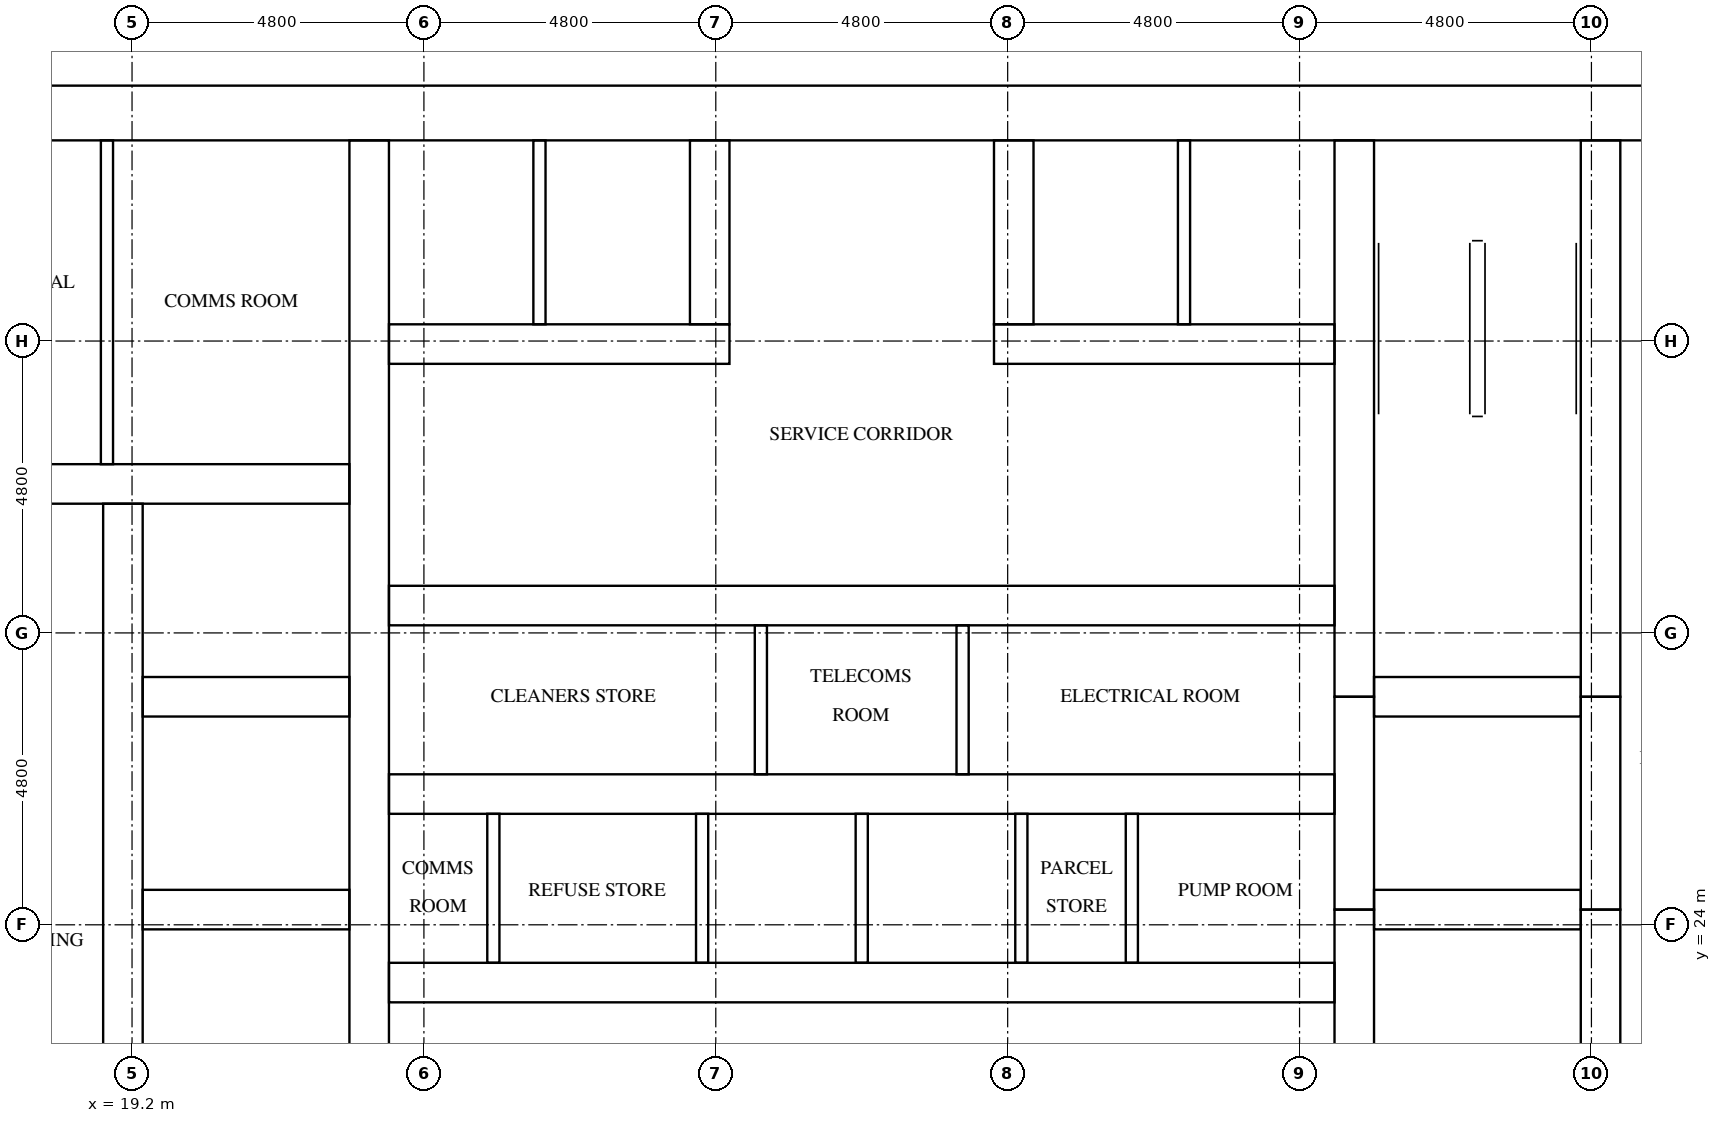
"""IFC4 building model, lengths in metres.
Left out: names, types, materials, properties, quantities, classifications, styles, units other than length and angle.
Written with IfcOpenShell. Run it as: python <this file> out.ifc"""

import sys

from ifc_helpers import new_model, si_unit, direction, frame, frame_2d, origin, place, context, subcontext, project, spatial, rectangle, extrude, element, fill, save


model = new_model("IFC4")
c1 = context("Model", 3, precision=1e-05, world=origin(), true_north=direction((0.0, 1.0)))
c2 = subcontext(c1, "Body", "Model", "MODEL_VIEW")
j1 = project(units=[si_unit("LENGTHUNIT", "METRE"), si_unit("PLANEANGLEUNIT", "RADIAN")], contexts=[c1])
p1 = place(None, origin())
s1 = spatial("IfcSite", under=j1, at=p1, CompositionType="ELEMENT")
p2 = place(p1, origin())
s2 = spatial("IfcBuilding", under=s1, at=p2, CompositionType="ELEMENT")
p3 = place(p2, frame((0.0, 0.0, 110.2)))
s3 = spatial("IfcBuildingStorey", under=s2, at=p3, CompositionType="ELEMENT", Elevation=110.2)
p4 = place(p3, frame((15.0, 37.35, 0.0), z_axis=(0.0, 0.0, 1.0), x_axis=(1.0, 0.0, 0.0)))
e1 = element("IfcWall", 1, at=p4, inside=s3, PredefinedType="SHEAR", context=c2, shape_type="SweptSolid", body=[
    extrude(rectangle(XDim=32.4, YDim=0.9, at=frame_2d((16.2, 0.0))), origin(), (0.0, 0.0, 1.0), 3.1),
])
p5 = place(p4, frame((15.3, 0.0, 0.0)))
e2 = element("IfcOpeningElement", 2, at=p5, cuts=e1, PredefinedType="OPENING", context=c2, shape_type="SweptSolid", body=[
    extrude(rectangle(XDim=1.8, YDim=2.1, at=frame_2d((0.9, 1.05))), frame((0.0, 0.46, 0.0), z_axis=(0.0, -1.0, 0.0), x_axis=(1.0, 0.0, 0.0)), (0.0, 0.0, 1.0), 0.92),
])
p6 = place(p4, frame((1.794, 0.0, 0.0)))
e3 = element("IfcOpeningElement", 3, at=p6, cuts=e1, PredefinedType="OPENING", context=c2, shape_type="SweptSolid", body=[
    extrude(rectangle(XDim=1.0, YDim=2.1, at=frame_2d((0.5, 1.05))), frame((0.0, 0.46, 0.0), z_axis=(0.0, -1.0, 0.0), x_axis=(1.0, 0.0, 0.0)), (0.0, 0.0, 1.0), 0.92),
])
p7 = place(p4, frame((5.331, 0.0, 0.0)))
e4 = element("IfcOpeningElement", 4, at=p7, cuts=e1, PredefinedType="OPENING", context=c2, shape_type="SweptSolid", body=[
    extrude(rectangle(XDim=1.0, YDim=2.1, at=frame_2d((0.5, 1.05))), frame((0.0, 0.46, 0.0), z_axis=(0.0, -1.0, 0.0), x_axis=(1.0, 0.0, 0.0)), (0.0, 0.0, 1.0), 0.92),
])
p8 = place(p3, frame((19.05, 15.9, 0.0), z_axis=(0.0, 0.0, 1.0), x_axis=(0.0, 1.0, 0.0)))
e5 = element("IfcWall", 5, at=p8, inside=s3, PredefinedType="SHEAR", context=c2, shape_type="SweptSolid", body=[
    extrude(rectangle(XDim=15.025, YDim=0.65, at=frame_2d((7.513, 0.0))), origin(), (0.0, 0.0, 1.0), 3.1),
])
p9 = place(p8, frame((9.55, 0.0, 0.0)))
e6 = element("IfcOpeningElement", 6, at=p9, cuts=e5, PredefinedType="OPENING", context=c2, shape_type="SweptSolid", body=[
    extrude(rectangle(XDim=1.1, YDim=2.1, at=frame_2d((0.55, 1.05))), frame((0.0, 0.335, 0.0), z_axis=(0.0, -1.0, 0.0), x_axis=(1.0, 0.0, 0.0)), (0.0, 0.0, 1.0), 0.67),
])
p10 = place(p8, frame((13.05, 0.0, 0.0)))
e7 = element("IfcOpeningElement", 7, at=p10, cuts=e5, PredefinedType="OPENING", context=c2, shape_type="SweptSolid", body=[
    extrude(rectangle(XDim=1.1, YDim=2.1, at=frame_2d((0.55, 1.05))), frame((0.0, 0.335, 0.0), z_axis=(0.0, -1.0, 0.0), x_axis=(1.0, 0.0, 0.0)), (0.0, 0.0, 1.0), 0.67),
])
p11 = place(p8, frame((0.3, 0.0, 0.0)))
e8 = element("IfcOpeningElement", 8, at=p11, cuts=e5, PredefinedType="OPENING", context=c2, shape_type="SweptSolid", body=[
    extrude(rectangle(XDim=1.2, YDim=2.1, at=frame_2d((0.6, 1.05))), frame((0.0, 0.335, 0.0), z_axis=(0.0, -1.0, 0.0), x_axis=(1.0, 0.0, 0.0)), (0.0, 0.0, 1.0), 0.67),
])
p12 = place(p3, frame((23.1, 15.9, 0.0), z_axis=(0.0, 0.0, 1.0), x_axis=(0.0, 1.0, 0.0)))
e9 = element("IfcWall", 9, at=p12, inside=s3, PredefinedType="SHEAR", context=c2, shape_type="SweptSolid", body=[
    extrude(rectangle(XDim=21.0, YDim=0.65, at=frame_2d((10.5, 0.0))), origin(), (0.0, 0.0, 1.0), 3.1),
])
p13 = place(p3, frame((39.3, 15.9, 0.0), z_axis=(0.0, 0.0, 1.0), x_axis=(0.0, 1.0, 0.0)))
e10 = element("IfcWall", 10, at=p13, inside=s3, PredefinedType="SHEAR", context=c2, shape_type="SweptSolid", body=[
    extrude(rectangle(XDim=8.35, YDim=0.65, at=frame_2d((4.175, 0.0))), origin(), (0.0, 0.0, 1.0), 3.1),
])
p14 = place(p3, frame((39.3, 24.25, 0.0), z_axis=(0.0, 0.0, 1.0), x_axis=(0.0, 1.0, 0.0)))
e11 = element("IfcWall", 11, at=p14, inside=s3, PredefinedType="SHEAR", context=c2, shape_type="SweptSolid", body=[
    extrude(rectangle(XDim=3.5, YDim=0.65, at=frame_2d((1.75, 0.0))), origin(), (0.0, 0.0, 1.0), 3.1),
])
p15 = place(p3, frame((39.3, 27.75, 0.0), z_axis=(0.0, 0.0, 1.0), x_axis=(0.0, 1.0, 0.0)))
e12 = element("IfcWall", 12, at=p15, inside=s3, PredefinedType="SHEAR", context=c2, shape_type="SweptSolid", body=[
    extrude(rectangle(XDim=9.15, YDim=0.65, at=frame_2d((4.575, 0.0))), origin(), (0.0, 0.0, 1.0), 3.1),
])
p16 = place(p3, frame((43.35, 15.9, 0.0), z_axis=(0.0, 0.0, 1.0), x_axis=(0.0, 1.0, 0.0)))
e13 = element("IfcWall", 13, at=p16, inside=s3, PredefinedType="SHEAR", context=c2, shape_type="SweptSolid", body=[
    extrude(rectangle(XDim=8.35, YDim=0.65, at=frame_2d((4.175, 0.0))), origin(), (0.0, 0.0, 1.0), 3.1),
])
p17 = place(p16, frame((0.3, 0.0, 0.0)))
e14 = element("IfcOpeningElement", 14, at=p17, cuts=e13, PredefinedType="OPENING", context=c2, shape_type="SweptSolid", body=[
    extrude(rectangle(XDim=1.2, YDim=2.1, at=frame_2d((0.6, 1.05))), frame((0.0, 0.335, 0.0), z_axis=(0.0, -1.0, 0.0), x_axis=(1.0, 0.0, 0.0)), (0.0, 0.0, 1.0), 0.67),
])
p18 = place(p3, frame((43.35, 24.25, 0.0), z_axis=(0.0, 0.0, 1.0), x_axis=(0.0, 1.0, 0.0)))
e15 = element("IfcWall", 15, at=p18, inside=s3, PredefinedType="SHEAR", context=c2, shape_type="SweptSolid", body=[
    extrude(rectangle(XDim=3.5, YDim=0.65, at=frame_2d((1.75, 0.0))), origin(), (0.0, 0.0, 1.0), 3.1),
])
p19 = place(p18, frame((1.2, 0.0, 0.0)))
e16 = element("IfcOpeningElement", 16, at=p19, cuts=e15, PredefinedType="OPENING", context=c2, shape_type="SweptSolid", body=[
    extrude(rectangle(XDim=1.1, YDim=2.1, at=frame_2d((0.55, 1.05))), frame((0.0, 0.335, 0.0), z_axis=(0.0, -1.0, 0.0), x_axis=(1.0, 0.0, 0.0)), (0.0, 0.0, 1.0), 0.67),
])
p20 = place(p3, frame((43.35, 27.75, 0.0), z_axis=(0.0, 0.0, 1.0), x_axis=(0.0, 1.0, 0.0)))
e17 = element("IfcWall", 17, at=p20, inside=s3, PredefinedType="SHEAR", context=c2, shape_type="SweptSolid", body=[
    extrude(rectangle(XDim=9.15, YDim=0.65, at=frame_2d((4.575, 0.0))), origin(), (0.0, 0.0, 1.0), 3.1),
])
p21 = place(p20, frame((7.65, 0.0, 0.0)))
e18 = element("IfcOpeningElement", 18, at=p21, cuts=e17, PredefinedType="OPENING", context=c2, shape_type="SweptSolid", body=[
    extrude(rectangle(XDim=1.2, YDim=2.1, at=frame_2d((0.6, 1.05))), frame((0.0, 0.335, 0.0), z_axis=(0.0, -1.0, 0.0), x_axis=(1.0, 0.0, 0.0)), (0.0, 0.0, 1.0), 0.67),
])
for number, where, z_axis, x_axis in (
    (19, (19.375, 24.25, 0.0), (0.0, 0.0, 1.0), (1.0, 0.0, 0.0)),
    (20, (19.375, 27.75, 0.0), (0.0, 0.0, 1.0), (1.0, 0.0, 0.0)),
):
    element("IfcWall", number, at=place(p3, frame(where, z_axis=z_axis, x_axis=x_axis)), inside=s3, PredefinedType="SHEAR", context=c2, shape_type="SweptSolid", body=[
        extrude(rectangle(XDim=3.4, YDim=0.65, at=frame_2d((1.7, 0.0))), origin(), (0.0, 0.0, 1.0), 3.1),
    ])
p22 = place(p3, frame((15.9, 31.25, 0.0), z_axis=(0.0, 0.0, 1.0), x_axis=(1.0, 0.0, 0.0)))
e21 = element("IfcWall", 21, at=p22, inside=s3, PredefinedType="SHEAR", context=c2, shape_type="SweptSolid", body=[
    extrude(rectangle(XDim=6.875, YDim=0.65, at=frame_2d((3.438, 0.0))), origin(), (0.0, 0.0, 1.0), 3.1),
])
for number, where, z_axis, x_axis in (
    (22, (39.625, 24.25, 0.0), (0.0, 0.0, 1.0), (1.0, 0.0, 0.0)),
    (23, (39.625, 27.75, 0.0), (0.0, 0.0, 1.0), (1.0, 0.0, 0.0)),
):
    element("IfcWall", number, at=place(p3, frame(where, z_axis=z_axis, x_axis=x_axis)), inside=s3, PredefinedType="SHEAR", context=c2, shape_type="SweptSolid", body=[
        extrude(rectangle(XDim=3.4, YDim=0.65, at=frame_2d((1.7, 0.0))), origin(), (0.0, 0.0, 1.0), 3.1),
    ])
p23 = place(p3, frame((23.425, 23.05, 0.0), z_axis=(0.0, 0.0, 1.0), x_axis=(1.0, 0.0, 0.0)))
e24 = element("IfcWall", 24, at=p23, inside=s3, PredefinedType="SHEAR", context=c2, shape_type="SweptSolid", body=[
    extrude(rectangle(XDim=15.55, YDim=0.65, at=frame_2d((7.775, 0.0))), origin(), (0.0, 0.0, 1.0), 3.1),
])
p24 = place(p23, frame((0.309, 0.0, 0.0)))
e25 = element("IfcOpeningElement", 25, at=p24, cuts=e24, PredefinedType="OPENING", context=c2, shape_type="SweptSolid", body=[
    extrude(rectangle(XDim=1.0, YDim=2.1, at=frame_2d((0.5, 1.05))), frame((0.0, 0.335, 0.0), z_axis=(0.0, -1.0, 0.0), x_axis=(1.0, 0.0, 0.0)), (0.0, 0.0, 1.0), 0.67),
])
p25 = place(p23, frame((2.934, 0.0, 0.0)))
e26 = element("IfcOpeningElement", 26, at=p25, cuts=e24, PredefinedType="OPENING", context=c2, shape_type="SweptSolid", body=[
    extrude(rectangle(XDim=1.0, YDim=2.1, at=frame_2d((0.5, 1.05))), frame((0.0, 0.335, 0.0), z_axis=(0.0, -1.0, 0.0), x_axis=(1.0, 0.0, 0.0)), (0.0, 0.0, 1.0), 0.67),
])
p26 = place(p23, frame((10.809, 0.0, 0.0)))
e27 = element("IfcOpeningElement", 27, at=p26, cuts=e24, PredefinedType="OPENING", context=c2, shape_type="SweptSolid", body=[
    extrude(rectangle(XDim=1.0, YDim=2.1, at=frame_2d((0.5, 1.05))), frame((0.0, 0.335, 0.0), z_axis=(0.0, -1.0, 0.0), x_axis=(1.0, 0.0, 0.0)), (0.0, 0.0, 1.0), 0.67),
])
p27 = place(p23, frame((13.434, 0.0, 0.0)))
e28 = element("IfcOpeningElement", 28, at=p27, cuts=e24, PredefinedType="OPENING", context=c2, shape_type="SweptSolid", body=[
    extrude(rectangle(XDim=1.0, YDim=2.1, at=frame_2d((0.5, 1.05))), frame((0.0, 0.335, 0.0), z_axis=(0.0, -1.0, 0.0), x_axis=(1.0, 0.0, 0.0)), (0.0, 0.0, 1.0), 0.67),
])
p28 = place(p3, frame((23.425, 26.15, 0.0), z_axis=(0.0, 0.0, 1.0), x_axis=(1.0, 0.0, 0.0)))
e29 = element("IfcWall", 29, at=p28, inside=s3, PredefinedType="SHEAR", context=c2, shape_type="SweptSolid", body=[
    extrude(rectangle(XDim=15.55, YDim=0.65, at=frame_2d((7.775, 0.0))), origin(), (0.0, 0.0, 1.0), 3.1),
])
p29 = place(p3, frame((23.425, 29.25, 0.0), z_axis=(0.0, 0.0, 1.0), x_axis=(1.0, 0.0, 0.0)))
e30 = element("IfcWall", 30, at=p29, inside=s3, PredefinedType="SHEAR", context=c2, shape_type="SweptSolid", body=[
    extrude(rectangle(XDim=15.55, YDim=0.65, at=frame_2d((7.775, 0.0))), origin(), (0.0, 0.0, 1.0), 3.1),
])
p30 = place(p29, frame((2.508, 0.0, 0.0)))
e31 = element("IfcOpeningElement", 31, at=p30, cuts=e30, PredefinedType="OPENING", context=c2, shape_type="SweptSolid", body=[
    extrude(rectangle(XDim=1.0, YDim=2.1, at=frame_2d((0.5, 1.05))), frame((0.0, 0.335, 0.0), z_axis=(0.0, -1.0, 0.0), x_axis=(1.0, 0.0, 0.0)), (0.0, 0.0, 1.0), 0.67),
])
p31 = place(p29, frame((7.275, 0.0, 0.0)))
e32 = element("IfcOpeningElement", 32, at=p31, cuts=e30, PredefinedType="OPENING", context=c2, shape_type="SweptSolid", body=[
    extrude(rectangle(XDim=1.0, YDim=2.1, at=frame_2d((0.5, 1.05))), frame((0.0, 0.335, 0.0), z_axis=(0.0, -1.0, 0.0), x_axis=(1.0, 0.0, 0.0)), (0.0, 0.0, 1.0), 0.67),
])
p32 = place(p29, frame((12.042, 0.0, 0.0)))
e33 = element("IfcOpeningElement", 33, at=p32, cuts=e30, PredefinedType="OPENING", context=c2, shape_type="SweptSolid", body=[
    extrude(rectangle(XDim=1.0, YDim=2.1, at=frame_2d((0.5, 1.05))), frame((0.0, 0.335, 0.0), z_axis=(0.0, -1.0, 0.0), x_axis=(1.0, 0.0, 0.0)), (0.0, 0.0, 1.0), 0.67),
])
p33 = place(p3, frame((23.425, 33.55, 0.0), z_axis=(0.0, 0.0, 1.0), x_axis=(1.0, 0.0, 0.0)))
e34 = element("IfcWall", 34, at=p33, inside=s3, PredefinedType="SHEAR", context=c2, shape_type="SweptSolid", body=[
    extrude(rectangle(XDim=5.6, YDim=0.65, at=frame_2d((2.8, 0.0))), origin(), (0.0, 0.0, 1.0), 3.1),
])
p34 = place(p3, frame((33.375, 33.55, 0.0), z_axis=(0.0, 0.0, 1.0), x_axis=(1.0, 0.0, 0.0)))
e35 = element("IfcWall", 35, at=p34, inside=s3, PredefinedType="SHEAR", context=c2, shape_type="SweptSolid", body=[
    extrude(rectangle(XDim=5.6, YDim=0.65, at=frame_2d((2.8, 0.0))), origin(), (0.0, 0.0, 1.0), 3.1),
])
for number, where, z_axis, x_axis in (
    (36, (28.7, 33.875, 0.0), (0.0, 0.0, 1.0), (0.0, 1.0, 0.0)),
    (37, (33.7, 33.875, 0.0), (0.0, 0.0, 1.0), (0.0, 1.0, 0.0)),
):
    element("IfcWall", number, at=place(p3, frame(where, z_axis=z_axis, x_axis=x_axis)), inside=s3, PredefinedType="SHEAR", context=c2, shape_type="SweptSolid", body=[
        extrude(rectangle(XDim=3.025, YDim=0.65, at=frame_2d((1.512, 0.0))), origin(), (0.0, 0.0, 1.0), 3.1),
    ])
for number, where, z_axis, x_axis in (
    (38, (28.575, 23.375, 0.0), (0.0, 0.0, 1.0), (0.0, 1.0, 0.0)),
    (39, (31.2, 23.375, 0.0), (0.0, 0.0, 1.0), (0.0, 1.0, 0.0)),
    (40, (33.825, 23.375, 0.0), (0.0, 0.0, 1.0), (0.0, 1.0, 0.0)),
):
    element("IfcWall", number, at=place(p3, frame(where, z_axis=z_axis, x_axis=x_axis)), inside=s3, PredefinedType="SOLIDWALL", context=c2, shape_type="SweptSolid", body=[
        extrude(rectangle(XDim=2.45, YDim=0.2, at=frame_2d((1.225, 0.0))), origin(), (0.0, 0.0, 1.0), 3.1),
    ])
for number, where, z_axis, x_axis in (
    (41, (25.9, 33.875, 0.0), (0.0, 0.0, 1.0), (0.0, 1.0, 0.0)),
    (42, (36.5, 33.875, 0.0), (0.0, 0.0, 1.0), (0.0, 1.0, 0.0)),
):
    element("IfcWall", number, at=place(p3, frame(where, z_axis=z_axis, x_axis=x_axis)), inside=s3, PredefinedType="SOLIDWALL", context=c2, shape_type="SweptSolid", body=[
        extrude(rectangle(XDim=3.025, YDim=0.2, at=frame_2d((1.512, 0.0))), origin(), (0.0, 0.0, 1.0), 3.1),
    ])
p35 = place(p3, frame((18.788, 31.575, 0.0), z_axis=(0.0, 0.0, 1.0), x_axis=(0.0, 1.0, 0.0)))
e43 = element("IfcWall", 43, at=p35, inside=s3, PredefinedType="PARTITIONING", context=c2, shape_type="SweptSolid", body=[
    extrude(rectangle(XDim=5.325, YDim=0.2, at=frame_2d((2.663, 0.0))), origin(), (0.0, 0.0, 1.0), 3.1),
])
for number, where, z_axis, x_axis in (
    (44, (25.142, 23.375, 0.0), (0.0, 0.0, 1.0), (0.0, 1.0, 0.0)),
    (45, (35.642, 23.375, 0.0), (0.0, 0.0, 1.0), (0.0, 1.0, 0.0)),
    (46, (29.541, 26.475, 0.0), (0.0, 0.0, 1.0), (0.0, 1.0, 0.0)),
    (47, (32.859, 26.475, 0.0), (0.0, 0.0, 1.0), (0.0, 1.0, 0.0)),
):
    element("IfcWall", number, at=place(p3, frame(where, z_axis=z_axis, x_axis=x_axis)), inside=s3, PredefinedType="PARTITIONING", context=c2, shape_type="SweptSolid", body=[
        extrude(rectangle(XDim=2.45, YDim=0.2, at=frame_2d((1.225, 0.0))), origin(), (0.0, 0.0, 1.0), 3.1),
    ])
p36 = place(p9, origin())
e48 = element("IfcDoor", 48, at=p36, inside=s3, OperationType="DOUBLE_DOOR_SLIDING", PredefinedType="DOOR", context=c2, shape_type="SweptSolid", body=[
    extrude(rectangle(XDim=1.1, YDim=2.1, at=frame_2d((0.55, 1.05))), frame((0.0, 0.025, 0.0), z_axis=(0.0, -1.0, 0.0), x_axis=(1.0, 0.0, 0.0)), (0.0, 0.0, 1.0), 0.05),
])
fill(e6, e48)
p37 = place(p10, origin())
e49 = element("IfcDoor", 49, at=p37, inside=s3, OperationType="DOUBLE_DOOR_SLIDING", PredefinedType="DOOR", context=c2, shape_type="SweptSolid", body=[
    extrude(rectangle(XDim=1.1, YDim=2.1, at=frame_2d((0.55, 1.05))), frame((0.0, 0.025, 0.0), z_axis=(0.0, -1.0, 0.0), x_axis=(1.0, 0.0, 0.0)), (0.0, 0.0, 1.0), 0.05),
])
fill(e7, e49)
p38 = place(p19, origin())
e50 = element("IfcDoor", 50, at=p38, inside=s3, OperationType="DOUBLE_DOOR_SLIDING", PredefinedType="DOOR", context=c2, shape_type="SweptSolid", body=[
    extrude(rectangle(XDim=1.1, YDim=2.1, at=frame_2d((0.55, 1.05))), frame((0.0, 0.025, 0.0), z_axis=(0.0, -1.0, 0.0), x_axis=(1.0, 0.0, 0.0)), (0.0, 0.0, 1.0), 0.05),
])
fill(e16, e50)
p39 = place(p21, origin())
e51 = element("IfcDoor", 51, at=p39, inside=s3, OperationType="SINGLE_SWING_RIGHT", PredefinedType="DOOR", context=c2, shape_type="SweptSolid", body=[
    extrude(rectangle(XDim=1.2, YDim=2.1, at=frame_2d((0.6, 1.05))), frame((0.0, 0.025, 0.0), z_axis=(0.0, -1.0, 0.0), x_axis=(1.0, 0.0, 0.0)), (0.0, 0.0, 1.0), 0.05),
])
fill(e18, e51)
p40 = place(p5, origin())
e52 = element("IfcDoor", 52, at=p40, inside=s3, OperationType="DOUBLE_DOOR_SINGLE_SWING", PredefinedType="DOOR", context=c2, shape_type="SweptSolid", body=[
    extrude(rectangle(XDim=1.8, YDim=2.1, at=frame_2d((0.9, 1.05))), frame((0.0, 0.025, 0.0), z_axis=(0.0, -1.0, 0.0), x_axis=(1.0, 0.0, 0.0)), (0.0, 0.0, 1.0), 0.05),
])
fill(e2, e52)
p41 = place(p7, origin())
e53 = element("IfcDoor", 53, at=p41, inside=s3, OperationType="SINGLE_SWING_RIGHT", PredefinedType="DOOR", context=c2, shape_type="SweptSolid", body=[
    extrude(rectangle(XDim=1.0, YDim=2.1, at=frame_2d((0.5, 1.05))), frame((0.0, 0.025, 0.0), z_axis=(0.0, -1.0, 0.0), x_axis=(1.0, 0.0, 0.0)), (0.0, 0.0, 1.0), 0.05),
])
fill(e4, e53)
p42 = place(p24, frame((1.0, 0.0, 0.0), z_axis=(0.0, 0.0, 1.0), x_axis=(-1.0, 0.0, 0.0)))
e54 = element("IfcDoor", 54, at=p42, inside=s3, OperationType="SINGLE_SWING_LEFT", PredefinedType="DOOR", context=c2, shape_type="SweptSolid", body=[
    extrude(rectangle(XDim=1.0, YDim=2.1, at=frame_2d((0.5, 1.05))), frame((0.0, 0.025, 0.0), z_axis=(0.0, -1.0, 0.0), x_axis=(1.0, 0.0, 0.0)), (0.0, 0.0, 1.0), 0.05),
])
fill(e25, e54)
p43 = place(p25, frame((1.0, 0.0, 0.0), z_axis=(0.0, 0.0, 1.0), x_axis=(-1.0, 0.0, 0.0)))
e55 = element("IfcDoor", 55, at=p43, inside=s3, OperationType="SINGLE_SWING_RIGHT", PredefinedType="DOOR", context=c2, shape_type="SweptSolid", body=[
    extrude(rectangle(XDim=1.0, YDim=2.1, at=frame_2d((0.5, 1.05))), frame((0.0, 0.025, 0.0), z_axis=(0.0, -1.0, 0.0), x_axis=(1.0, 0.0, 0.0)), (0.0, 0.0, 1.0), 0.05),
])
fill(e26, e55)
p44 = place(p26, frame((1.0, 0.0, 0.0), z_axis=(0.0, 0.0, 1.0), x_axis=(-1.0, 0.0, 0.0)))
e56 = element("IfcDoor", 56, at=p44, inside=s3, OperationType="SINGLE_SWING_LEFT", PredefinedType="DOOR", context=c2, shape_type="SweptSolid", body=[
    extrude(rectangle(XDim=1.0, YDim=2.1, at=frame_2d((0.5, 1.05))), frame((0.0, 0.025, 0.0), z_axis=(0.0, -1.0, 0.0), x_axis=(1.0, 0.0, 0.0)), (0.0, 0.0, 1.0), 0.05),
])
fill(e27, e56)
p45 = place(p27, frame((1.0, 0.0, 0.0), z_axis=(0.0, 0.0, 1.0), x_axis=(-1.0, 0.0, 0.0)))
e57 = element("IfcDoor", 57, at=p45, inside=s3, OperationType="SINGLE_SWING_RIGHT", PredefinedType="DOOR", context=c2, shape_type="SweptSolid", body=[
    extrude(rectangle(XDim=1.0, YDim=2.1, at=frame_2d((0.5, 1.05))), frame((0.0, 0.025, 0.0), z_axis=(0.0, -1.0, 0.0), x_axis=(1.0, 0.0, 0.0)), (0.0, 0.0, 1.0), 0.05),
])
fill(e28, e57)
p46 = place(p30, origin())
e58 = element("IfcDoor", 58, at=p46, inside=s3, OperationType="SINGLE_SWING_LEFT", PredefinedType="DOOR", context=c2, shape_type="SweptSolid", body=[
    extrude(rectangle(XDim=1.0, YDim=2.1, at=frame_2d((0.5, 1.05))), frame((0.0, 0.025, 0.0), z_axis=(0.0, -1.0, 0.0), x_axis=(1.0, 0.0, 0.0)), (0.0, 0.0, 1.0), 0.05),
])
fill(e31, e58)
p47 = place(p31, origin())
e59 = element("IfcDoor", 59, at=p47, inside=s3, OperationType="SINGLE_SWING_RIGHT", PredefinedType="DOOR", context=c2, shape_type="SweptSolid", body=[
    extrude(rectangle(XDim=1.0, YDim=2.1, at=frame_2d((0.5, 1.05))), frame((0.0, 0.025, 0.0), z_axis=(0.0, -1.0, 0.0), x_axis=(1.0, 0.0, 0.0)), (0.0, 0.0, 1.0), 0.05),
])
fill(e32, e59)
p48 = place(p32, origin())
e60 = element("IfcDoor", 60, at=p48, inside=s3, OperationType="SINGLE_SWING_LEFT", PredefinedType="DOOR", context=c2, shape_type="SweptSolid", body=[
    extrude(rectangle(XDim=1.0, YDim=2.1, at=frame_2d((0.5, 1.05))), frame((0.0, 0.025, 0.0), z_axis=(0.0, -1.0, 0.0), x_axis=(1.0, 0.0, 0.0)), (0.0, 0.0, 1.0), 0.05),
])
fill(e33, e60)
save(model, sys.argv[1])
